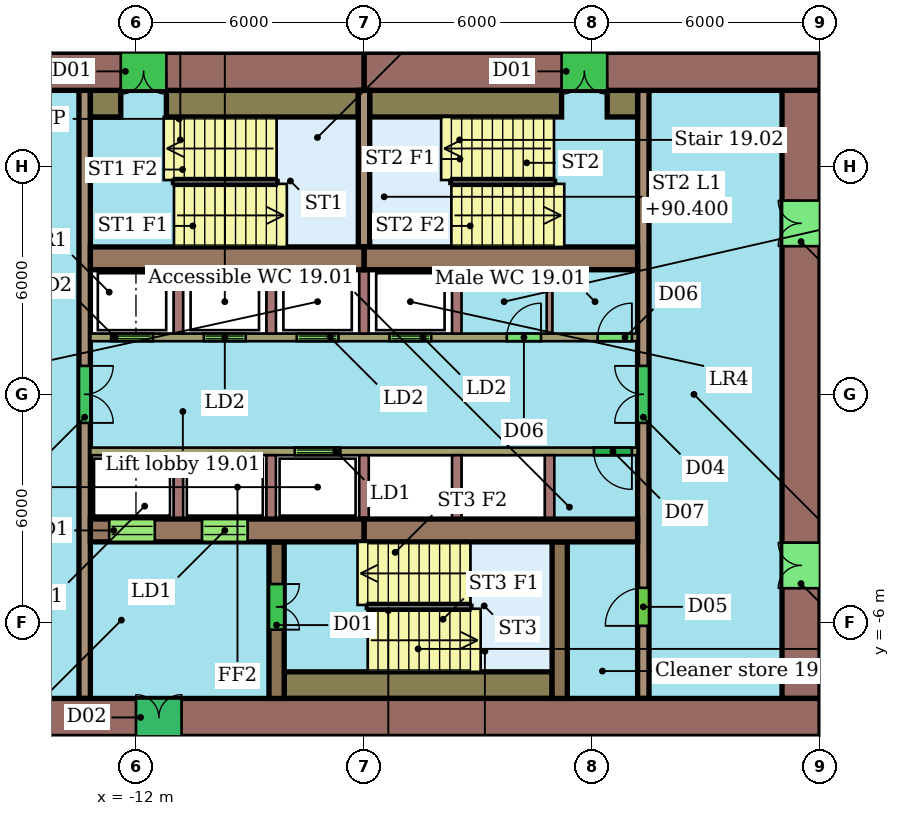
"""IFC4 building model, lengths in metres.
Left out: names, types, materials, properties, quantities, classifications, styles, units other than length and angle.
Written with IfcOpenShell. Run it as: python <this file> out.ifc"""

import sys

from ifc_helpers import new_model, si_unit, direction, frame, frame_2d, origin, place, context, subcontext, project, spatial, rectangle, extrude, element, fill, save


model = new_model("IFC4")
c1 = context("Model", 3, precision=1e-05, world=origin(), true_north=direction((0.0, 1.0)))
c2 = subcontext(c1, "Body", "Model", "MODEL_VIEW")
j1 = project(units=[si_unit("LENGTHUNIT", "METRE"), si_unit("PLANEANGLEUNIT", "RADIAN")], contexts=[c1])
p1 = place(None, origin())
s1 = spatial("IfcSite", under=j1, at=p1, CompositionType="ELEMENT")
p2 = place(p1, origin())
s2 = spatial("IfcBuilding", under=s1, at=p2, CompositionType="ELEMENT")
p3 = place(p2, frame((0.0, 0.0, 88.6)))
s3 = spatial("IfcBuildingStorey", under=s2, at=p3, CompositionType="ELEMENT", Elevation=88.6)
p4 = place(p3, frame((6.0, 8.5, 0.0), z_axis=(0.0, 0.0, 1.0), x_axis=(-1.0, 0.0, 0.0)))
e1 = element("IfcWall", 1, at=p4, inside=s3, PredefinedType="SHEAR", context=c2, shape_type="SweptSolid", body=[
    extrude(rectangle(XDim=12.0, YDim=1.0, at=frame_2d((6.0, 0.0))), origin(), (0.0, 0.0, 1.0), 3.3),
])
p5 = place(p4, frame((5.6, 0.0, 0.0)))
e2 = element("IfcOpeningElement", 2, at=p5, cuts=e1, PredefinedType="OPENING", context=c2, shape_type="SweptSolid", body=[
    extrude(rectangle(XDim=1.2, YDim=2.1, at=frame_2d((0.6, 1.05))), frame((0.0, 0.51, 0.0), z_axis=(0.0, -1.0, 0.0), x_axis=(1.0, 0.0, 0.0)), (0.0, 0.0, 1.0), 1.02),
])
p6 = place(p3, frame((-6.0, 8.5, 0.0), z_axis=(0.0, 0.0, 1.0), x_axis=(-1.0, 0.0, 0.0)))
e3 = element("IfcWall", 3, at=p6, inside=s3, PredefinedType="SHEAR", context=c2, shape_type="SweptSolid", body=[
    extrude(rectangle(XDim=12.0, YDim=1.0, at=frame_2d((6.0, 0.0))), origin(), (0.0, 0.0, 1.0), 3.3),
])
p7 = place(p6, frame((5.2, 0.0, 0.0)))
e4 = element("IfcOpeningElement", 4, at=p7, cuts=e3, PredefinedType="OPENING", context=c2, shape_type="SweptSolid", body=[
    extrude(rectangle(XDim=1.2, YDim=2.1, at=frame_2d((0.6, 1.05))), frame((0.0, 0.51, 0.0), z_axis=(0.0, -1.0, 0.0), x_axis=(1.0, 0.0, 0.0)), (0.0, 0.0, 1.0), 1.02),
])
p8 = place(p3, frame((-18.0, -8.5, 0.0), z_axis=(0.0, 0.0, 1.0), x_axis=(1.0, 0.0, 0.0)))
e5 = element("IfcWall", 5, at=p8, inside=s3, PredefinedType="SHEAR", context=c2, shape_type="SweptSolid", body=[
    extrude(rectangle(XDim=24.0, YDim=1.0, at=frame_2d((12.0, 0.0))), origin(), (0.0, 0.0, 1.0), 3.3),
])
p9 = place(p8, frame((6.0, 0.0, 0.0)))
e6 = element("IfcOpeningElement", 6, at=p9, cuts=e5, PredefinedType="OPENING", context=c2, shape_type="SweptSolid", body=[
    extrude(rectangle(XDim=1.2, YDim=2.1, at=frame_2d((0.6, 1.05))), frame((0.0, 0.51, 0.0), z_axis=(0.0, -1.0, 0.0), x_axis=(1.0, 0.0, 0.0)), (0.0, 0.0, 1.0), 1.02),
])
p10 = place(p3, frame((5.5, -8.0, 0.0), z_axis=(0.0, 0.0, 1.0), x_axis=(0.0, 1.0, 0.0)))
e7 = element("IfcWall", 7, at=p10, inside=s3, PredefinedType="SHEAR", context=c2, shape_type="SweptSolid", body=[
    extrude(rectangle(XDim=16.0, YDim=1.0, at=frame_2d((8.0, 0.0))), origin(), (0.0, 0.0, 1.0), 3.3),
])
p11 = place(p10, frame((2.9, 0.0, 0.0)))
e8 = element("IfcOpeningElement", 8, at=p11, cuts=e7, PredefinedType="OPENING", context=c2, shape_type="SweptSolid", body=[
    extrude(rectangle(XDim=1.2, YDim=2.1, at=frame_2d((0.6, 1.05))), frame((0.0, 0.51, 0.0), z_axis=(0.0, -1.0, 0.0), x_axis=(1.0, 0.0, 0.0)), (0.0, 0.0, 1.0), 1.02),
])
p12 = place(p10, frame((11.9, 0.0, 0.0)))
e9 = element("IfcOpeningElement", 9, at=p12, cuts=e7, PredefinedType="OPENING", context=c2, shape_type="SweptSolid", body=[
    extrude(rectangle(XDim=1.2, YDim=2.1, at=frame_2d((0.6, 1.05))), frame((0.0, 0.51, 0.0), z_axis=(0.0, -1.0, 0.0), x_axis=(1.0, 0.0, 0.0)), (0.0, 0.0, 1.0), 1.02),
])
for number, where, z_axis, x_axis in (
    (10, (-13.2, 3.58, 0.0), (0.0, 0.0, 1.0), (1.0, 0.0, 0.0)),
    (11, (-6.0, 3.58, 0.0), (0.0, 0.0, 1.0), (1.0, 0.0, 0.0)),
):
    element("IfcWall", number, at=place(p3, frame(where, z_axis=z_axis, x_axis=x_axis)), inside=s3, PredefinedType="SHEAR", context=c2, shape_type="SweptSolid", body=[
        extrude(rectangle(XDim=7.2, YDim=0.6, at=frame_2d((3.6, 0.0))), origin(), (0.0, 0.0, 1.0), 3.3),
    ])
p13 = place(p3, frame((-13.2, -3.58, 0.0), z_axis=(0.0, 0.0, 1.0), x_axis=(1.0, 0.0, 0.0)))
e12 = element("IfcWall", 12, at=p13, inside=s3, PredefinedType="SHEAR", context=c2, shape_type="SweptSolid", body=[
    extrude(rectangle(XDim=7.2, YDim=0.6, at=frame_2d((3.6, 0.0))), origin(), (0.0, 0.0, 1.0), 3.3),
])
p14 = place(p13, frame((0.496, 0.0, 0.0)))
e13 = element("IfcOpeningElement", 13, at=p14, cuts=e12, PredefinedType="OPENING", context=c2, shape_type="SweptSolid", body=[
    extrude(rectangle(XDim=1.2, YDim=2.1, at=frame_2d((0.6, 1.05))), frame((0.0, 0.31, 0.0), z_axis=(0.0, -1.0, 0.0), x_axis=(1.0, 0.0, 0.0)), (0.0, 0.0, 1.0), 0.62),
])
p15 = place(p13, frame((2.938, 0.0, 0.0)))
e14 = element("IfcOpeningElement", 14, at=p15, cuts=e12, PredefinedType="OPENING", context=c2, shape_type="SweptSolid", body=[
    extrude(rectangle(XDim=1.2, YDim=2.1, at=frame_2d((0.6, 1.05))), frame((0.0, 0.31, 0.0), z_axis=(0.0, -1.0, 0.0), x_axis=(1.0, 0.0, 0.0)), (0.0, 0.0, 1.0), 0.62),
])
p16 = place(p3, frame((-6.0, -3.58, 0.0), z_axis=(0.0, 0.0, 1.0), x_axis=(1.0, 0.0, 0.0)))
e15 = element("IfcWall", 15, at=p16, inside=s3, PredefinedType="SHEAR", context=c2, shape_type="SweptSolid", body=[
    extrude(rectangle(XDim=7.2, YDim=0.6, at=frame_2d((3.6, 0.0))), origin(), (0.0, 0.0, 1.0), 3.3),
])
p17 = place(p3, frame((-13.35, 8.0, 0.0), z_axis=(0.0, 0.0, 1.0), x_axis=(0.0, -1.0, 0.0)))
e16 = element("IfcWall", 16, at=p17, inside=s3, PredefinedType="SHEAR", context=c2, shape_type="SweptSolid", body=[
    extrude(rectangle(XDim=16.0, YDim=0.3, at=frame_2d((8.0, 0.0))), origin(), (0.0, 0.0, 1.0), 3.3),
])
p18 = place(p17, frame((7.25, 0.0, 0.0)))
e17 = element("IfcOpeningElement", 17, at=p18, cuts=e16, PredefinedType="OPENING", context=c2, shape_type="SweptSolid", body=[
    extrude(rectangle(XDim=1.5, YDim=2.1, at=frame_2d((0.75, 1.05))), frame((0.0, 0.16, 0.0), z_axis=(0.0, -1.0, 0.0), x_axis=(1.0, 0.0, 0.0)), (0.0, 0.0, 1.0), 0.32),
])
p19 = place(p3, frame((1.35, -8.0, 0.0), z_axis=(0.0, 0.0, 1.0), x_axis=(0.0, 1.0, 0.0)))
e18 = element("IfcWall", 18, at=p19, inside=s3, PredefinedType="SHEAR", context=c2, shape_type="SweptSolid", body=[
    extrude(rectangle(XDim=16.0, YDim=0.3, at=frame_2d((8.0, 0.0))), origin(), (0.0, 0.0, 1.0), 3.3),
])
p20 = place(p19, frame((1.91, 0.0, 0.0)))
e19 = element("IfcOpeningElement", 19, at=p20, cuts=e18, PredefinedType="OPENING", context=c2, shape_type="SweptSolid", body=[
    extrude(rectangle(XDim=1.0, YDim=2.1, at=frame_2d((0.5, 1.05))), frame((0.0, 0.16, 0.0), z_axis=(0.0, -1.0, 0.0), x_axis=(1.0, 0.0, 0.0)), (0.0, 0.0, 1.0), 0.32),
])
p21 = place(p19, frame((7.25, 0.0, 0.0)))
e20 = element("IfcOpeningElement", 20, at=p21, cuts=e18, PredefinedType="OPENING", context=c2, shape_type="SweptSolid", body=[
    extrude(rectangle(XDim=1.5, YDim=2.1, at=frame_2d((0.75, 1.05))), frame((0.0, 0.16, 0.0), z_axis=(0.0, -1.0, 0.0), x_axis=(1.0, 0.0, 0.0)), (0.0, 0.0, 1.0), 0.32),
])
p22 = place(p3, frame((-13.2, 1.5, 0.0), z_axis=(0.0, 0.0, 1.0), x_axis=(1.0, 0.0, 0.0)))
e21 = element("IfcWall", 21, at=p22, inside=s3, PredefinedType="SHEAR", context=c2, shape_type="SweptSolid", body=[
    extrude(rectangle(XDim=14.4, YDim=0.2, at=frame_2d((7.2, 0.0))), origin(), (0.0, 0.0, 1.0), 3.3),
])
p23 = place(p22, frame((0.546, 0.0, 0.0)))
e22 = element("IfcOpeningElement", 22, at=p23, cuts=e21, PredefinedType="OPENING", context=c2, shape_type="SweptSolid", body=[
    extrude(rectangle(XDim=1.1, YDim=2.1, at=frame_2d((0.55, 1.05))), frame((0.0, 0.11, 0.0), z_axis=(0.0, -1.0, 0.0), x_axis=(1.0, 0.0, 0.0)), (0.0, 0.0, 1.0), 0.22),
])
p24 = place(p22, frame((2.988, 0.0, 0.0)))
e23 = element("IfcOpeningElement", 23, at=p24, cuts=e21, PredefinedType="OPENING", context=c2, shape_type="SweptSolid", body=[
    extrude(rectangle(XDim=1.1, YDim=2.1, at=frame_2d((0.55, 1.05))), frame((0.0, 0.11, 0.0), z_axis=(0.0, -1.0, 0.0), x_axis=(1.0, 0.0, 0.0)), (0.0, 0.0, 1.0), 0.22),
])
p25 = place(p22, frame((5.429, 0.0, 0.0)))
e24 = element("IfcOpeningElement", 24, at=p25, cuts=e21, PredefinedType="OPENING", context=c2, shape_type="SweptSolid", body=[
    extrude(rectangle(XDim=1.1, YDim=2.1, at=frame_2d((0.55, 1.05))), frame((0.0, 0.11, 0.0), z_axis=(0.0, -1.0, 0.0), x_axis=(1.0, 0.0, 0.0)), (0.0, 0.0, 1.0), 0.22),
])
p26 = place(p22, frame((7.871, 0.0, 0.0)))
e25 = element("IfcOpeningElement", 25, at=p26, cuts=e21, PredefinedType="OPENING", context=c2, shape_type="SweptSolid", body=[
    extrude(rectangle(XDim=1.1, YDim=2.1, at=frame_2d((0.55, 1.05))), frame((0.0, 0.11, 0.0), z_axis=(0.0, -1.0, 0.0), x_axis=(1.0, 0.0, 0.0)), (0.0, 0.0, 1.0), 0.22),
])
p27 = place(p22, frame((10.958, 0.0, 0.0)))
e26 = element("IfcOpeningElement", 26, at=p27, cuts=e21, PredefinedType="OPENING", context=c2, shape_type="SweptSolid", body=[
    extrude(rectangle(XDim=0.9, YDim=2.1, at=frame_2d((0.45, 1.05))), frame((0.0, 0.11, 0.0), z_axis=(0.0, -1.0, 0.0), x_axis=(1.0, 0.0, 0.0)), (0.0, 0.0, 1.0), 0.22),
])
p28 = place(p22, frame((13.35, 0.0, 0.0)))
e27 = element("IfcOpeningElement", 27, at=p28, cuts=e21, PredefinedType="OPENING", context=c2, shape_type="SweptSolid", body=[
    extrude(rectangle(XDim=0.9, YDim=2.1, at=frame_2d((0.45, 1.05))), frame((0.0, 0.11, 0.0), z_axis=(0.0, -1.0, 0.0), x_axis=(1.0, 0.0, 0.0)), (0.0, 0.0, 1.0), 0.22),
])
p29 = place(p3, frame((1.2, -1.5, 0.0), z_axis=(0.0, 0.0, 1.0), x_axis=(-1.0, 0.0, 0.0)))
e28 = element("IfcWall", 28, at=p29, inside=s3, PredefinedType="SHEAR", context=c2, shape_type="SweptSolid", body=[
    extrude(rectangle(XDim=14.4, YDim=0.2, at=frame_2d((7.2, 0.0))), origin(), (0.0, 0.0, 1.0), 3.3),
])
p30 = place(p29, frame((7.821, 0.0, 0.0)))
e29 = element("IfcOpeningElement", 29, at=p30, cuts=e28, PredefinedType="OPENING", context=c2, shape_type="SweptSolid", body=[
    extrude(rectangle(XDim=1.2, YDim=2.1, at=frame_2d((0.6, 1.05))), frame((0.0, 0.11, 0.0), z_axis=(0.0, -1.0, 0.0), x_axis=(1.0, 0.0, 0.0)), (0.0, 0.0, 1.0), 0.22),
])
p31 = place(p29, frame((0.15, 0.0, 0.0)))
e30 = element("IfcOpeningElement", 30, at=p31, cuts=e28, PredefinedType="OPENING", context=c2, shape_type="SweptSolid", body=[
    extrude(rectangle(XDim=1.0, YDim=2.1, at=frame_2d((0.5, 1.05))), frame((0.0, 0.11, 0.0), z_axis=(0.0, -1.0, 0.0), x_axis=(1.0, 0.0, 0.0)), (0.0, 0.0, 1.0), 0.22),
])
p32 = place(p3, frame((-8.3, -3.88, 0.0), z_axis=(0.0, 0.0, 1.0), x_axis=(0.0, -1.0, 0.0)))
e31 = element("IfcWall", 31, at=p32, inside=s3, PredefinedType="SHEAR", context=c2, shape_type="SweptSolid", body=[
    extrude(rectangle(XDim=4.12, YDim=0.4, at=frame_2d((2.06, 0.0))), origin(), (0.0, 0.0, 1.0), 3.3),
])
p33 = place(p32, frame((1.11, 0.0, 0.0)))
e32 = element("IfcOpeningElement", 32, at=p33, cuts=e31, PredefinedType="OPENING", context=c2, shape_type="SweptSolid", body=[
    extrude(rectangle(XDim=1.2, YDim=2.1, at=frame_2d((0.6, 1.05))), frame((0.0, 0.21, 0.0), z_axis=(0.0, -1.0, 0.0), x_axis=(1.0, 0.0, 0.0)), (0.0, 0.0, 1.0), 0.42),
])
p34 = place(p3, frame((-0.85, -3.88, 0.0), z_axis=(0.0, 0.0, 1.0), x_axis=(0.0, -1.0, 0.0)))
e33 = element("IfcWall", 33, at=p34, inside=s3, PredefinedType="SHEAR", context=c2, shape_type="SweptSolid", body=[
    extrude(rectangle(XDim=4.12, YDim=0.4, at=frame_2d((2.06, 0.0))), origin(), (0.0, 0.0, 1.0), 3.3),
])
p35 = place(p3, frame((-6.0, 3.88, 0.0), z_axis=(0.0, 0.0, 1.0), x_axis=(0.0, 1.0, 0.0)))
e34 = element("IfcWall", 34, at=p35, inside=s3, PredefinedType="SHEAR", context=c2, shape_type="SweptSolid", body=[
    extrude(rectangle(XDim=4.12, YDim=0.3, at=frame_2d((2.06, 0.0))), origin(), (0.0, 0.0, 1.0), 3.3),
])
p36 = place(p3, frame((-13.2, 7.65, 0.0), z_axis=(0.0, 0.0, 1.0), x_axis=(1.0, 0.0, 0.0)))
e35 = element("IfcWall", 35, at=p36, inside=s3, PredefinedType="SHEAR", context=c2, shape_type="SweptSolid", body=[
    extrude(rectangle(XDim=0.8, YDim=0.7, at=frame_2d((0.4, 0.0))), origin(), (0.0, 0.0, 1.0), 3.3),
])
for number, where, z_axis, x_axis in (
    (36, (-11.2, 7.65, 0.0), (0.0, 0.0, 1.0), (1.0, 0.0, 0.0)),
    (37, (-5.85, 7.65, 0.0), (0.0, 0.0, 1.0), (1.0, 0.0, 0.0)),
):
    element("IfcWall", number, at=place(p3, frame(where, z_axis=z_axis, x_axis=x_axis)), inside=s3, PredefinedType="SHEAR", context=c2, shape_type="SweptSolid", body=[
        extrude(rectangle(XDim=5.05, YDim=0.7, at=frame_2d((2.525, 0.0))), origin(), (0.0, 0.0, 1.0), 3.3),
    ])
p37 = place(p3, frame((0.4, 7.65, 0.0), z_axis=(0.0, 0.0, 1.0), x_axis=(1.0, 0.0, 0.0)))
e38 = element("IfcWall", 38, at=p37, inside=s3, PredefinedType="SHEAR", context=c2, shape_type="SweptSolid", body=[
    extrude(rectangle(XDim=0.8, YDim=0.7, at=frame_2d((0.4, 0.0))), origin(), (0.0, 0.0, 1.0), 3.3),
])
p38 = place(p3, frame((-8.1, -7.65, 0.0), z_axis=(0.0, 0.0, 1.0), x_axis=(1.0, 0.0, 0.0)))
e39 = element("IfcWall", 39, at=p38, inside=s3, PredefinedType="SHEAR", context=c2, shape_type="SweptSolid", body=[
    extrude(rectangle(XDim=7.05, YDim=0.7, at=frame_2d((3.525, 0.0))), origin(), (0.0, 0.0, 1.0), 3.3),
])
for number, where, z_axis, x_axis in (
    (40, (-10.883, 1.6, 0.0), (0.0, 0.0, 1.0), (0.0, 1.0, 0.0)),
    (41, (-8.442, 1.6, 0.0), (0.0, 0.0, 1.0), (0.0, 1.0, 0.0)),
    (42, (-6.0, 1.6, 0.0), (0.0, 0.0, 1.0), (0.0, 1.0, 0.0)),
    (43, (-3.558, 1.6, 0.0), (0.0, 0.0, 1.0), (0.0, 1.0, 0.0)),
):
    element("IfcWall", number, at=place(p3, frame(where, z_axis=z_axis, x_axis=x_axis)), inside=s3, PredefinedType="SHEAR", context=c2, shape_type="SweptSolid", body=[
        extrude(rectangle(XDim=1.68, YDim=0.25, at=frame_2d((0.84, 0.0))), origin(), (0.0, 0.0, 1.0), 3.3),
    ])
p39 = place(p3, frame((-1.117, 1.6, 0.0), z_axis=(0.0, 0.0, 1.0), x_axis=(0.0, 1.0, 0.0)))
e44 = element("IfcWall", 44, at=p39, inside=s3, PredefinedType="PARTITIONING", context=c2, shape_type="SweptSolid", body=[
    extrude(rectangle(XDim=1.68, YDim=0.15, at=frame_2d((0.84, 0.0))), origin(), (0.0, 0.0, 1.0), 3.3),
])
for number, where, z_axis, x_axis in (
    (45, (-10.883, -1.6, 0.0), (0.0, 0.0, 1.0), (0.0, -1.0, 0.0)),
    (46, (-8.442, -1.6, 0.0), (0.0, 0.0, 1.0), (0.0, -1.0, 0.0)),
    (47, (-6.0, -1.6, 0.0), (0.0, 0.0, 1.0), (0.0, -1.0, 0.0)),
    (48, (-3.558, -1.6, 0.0), (0.0, 0.0, 1.0), (0.0, -1.0, 0.0)),
    (49, (-1.117, -1.6, 0.0), (0.0, 0.0, 1.0), (0.0, -1.0, 0.0)),
):
    element("IfcWall", number, at=place(p3, frame(where, z_axis=z_axis, x_axis=x_axis)), inside=s3, PredefinedType="SHEAR", context=c2, shape_type="SweptSolid", body=[
        extrude(rectangle(XDim=1.68, YDim=0.25, at=frame_2d((0.84, 0.0))), origin(), (0.0, 0.0, 1.0), 3.3),
    ])
p40 = place(p5, origin())
e50 = element("IfcDoor", 50, at=p40, inside=s3, OperationType="DOUBLE_DOOR_SINGLE_SWING", PredefinedType="NOTDEFINED", context=c2, shape_type="SweptSolid", body=[
    extrude(rectangle(XDim=1.2, YDim=2.1, at=frame_2d((0.6, 1.05))), frame((0.0, 0.025, 0.0), z_axis=(0.0, -1.0, 0.0), x_axis=(1.0, 0.0, 0.0)), (0.0, 0.0, 1.0), 0.05),
])
fill(e2, e50)
p41 = place(p7, origin())
e51 = element("IfcDoor", 51, at=p41, inside=s3, OperationType="DOUBLE_DOOR_SINGLE_SWING", PredefinedType="NOTDEFINED", context=c2, shape_type="SweptSolid", body=[
    extrude(rectangle(XDim=1.2, YDim=2.1, at=frame_2d((0.6, 1.05))), frame((0.0, 0.025, 0.0), z_axis=(0.0, -1.0, 0.0), x_axis=(1.0, 0.0, 0.0)), (0.0, 0.0, 1.0), 0.05),
])
fill(e4, e51)
p42 = place(p9, origin())
e52 = element("IfcDoor", 52, at=p42, inside=s3, OperationType="DOUBLE_DOOR_SINGLE_SWING", PredefinedType="NOTDEFINED", context=c2, shape_type="SweptSolid", body=[
    extrude(rectangle(XDim=1.2, YDim=2.1, at=frame_2d((0.6, 1.05))), frame((0.0, 0.025, 0.0), z_axis=(0.0, -1.0, 0.0), x_axis=(1.0, 0.0, 0.0)), (0.0, 0.0, 1.0), 0.05),
])
fill(e6, e52)
p43 = place(p11, origin())
e53 = element("IfcDoor", 53, at=p43, inside=s3, OperationType="DOUBLE_DOOR_SINGLE_SWING", PredefinedType="NOTDEFINED", context=c2, shape_type="SweptSolid", body=[
    extrude(rectangle(XDim=1.2, YDim=2.1, at=frame_2d((0.6, 1.05))), frame((0.0, 0.025, 0.0), z_axis=(0.0, -1.0, 0.0), x_axis=(1.0, 0.0, 0.0)), (0.0, 0.0, 1.0), 0.05),
])
fill(e8, e53)
p44 = place(p12, origin())
e54 = element("IfcDoor", 54, at=p44, inside=s3, OperationType="DOUBLE_DOOR_SINGLE_SWING", PredefinedType="NOTDEFINED", context=c2, shape_type="SweptSolid", body=[
    extrude(rectangle(XDim=1.2, YDim=2.1, at=frame_2d((0.6, 1.05))), frame((0.0, 0.025, 0.0), z_axis=(0.0, -1.0, 0.0), x_axis=(1.0, 0.0, 0.0)), (0.0, 0.0, 1.0), 0.05),
])
fill(e9, e54)
p45 = place(p14, origin())
e55 = element("IfcDoor", 55, at=p45, inside=s3, OperationType="DOUBLE_DOOR_SLIDING", PredefinedType="NOTDEFINED", context=c2, shape_type="SweptSolid", body=[
    extrude(rectangle(XDim=1.2, YDim=2.1, at=frame_2d((0.6, 1.05))), frame((0.0, 0.025, 0.0), z_axis=(0.0, -1.0, 0.0), x_axis=(1.0, 0.0, 0.0)), (0.0, 0.0, 1.0), 0.05),
])
fill(e13, e55)
p46 = place(p15, origin())
e56 = element("IfcDoor", 56, at=p46, inside=s3, OperationType="DOUBLE_DOOR_SLIDING", PredefinedType="NOTDEFINED", context=c2, shape_type="SweptSolid", body=[
    extrude(rectangle(XDim=1.2, YDim=2.1, at=frame_2d((0.6, 1.05))), frame((0.0, 0.025, 0.0), z_axis=(0.0, -1.0, 0.0), x_axis=(1.0, 0.0, 0.0)), (0.0, 0.0, 1.0), 0.05),
])
fill(e14, e56)
p47 = place(p18, origin())
e57 = element("IfcDoor", 57, at=p47, inside=s3, OperationType="DOUBLE_DOOR_SINGLE_SWING", PredefinedType="NOTDEFINED", context=c2, shape_type="SweptSolid", body=[
    extrude(rectangle(XDim=1.5, YDim=2.1, at=frame_2d((0.75, 1.05))), frame((0.0, 0.025, 0.0), z_axis=(0.0, -1.0, 0.0), x_axis=(1.0, 0.0, 0.0)), (0.0, 0.0, 1.0), 0.05),
])
fill(e17, e57)
p48 = place(p20, origin())
e58 = element("IfcDoor", 58, at=p48, inside=s3, OperationType="SINGLE_SWING_LEFT", PredefinedType="NOTDEFINED", context=c2, shape_type="SweptSolid", body=[
    extrude(rectangle(XDim=1.0, YDim=2.1, at=frame_2d((0.5, 1.05))), frame((0.0, 0.025, 0.0), z_axis=(0.0, -1.0, 0.0), x_axis=(1.0, 0.0, 0.0)), (0.0, 0.0, 1.0), 0.05),
])
fill(e19, e58)
p49 = place(p21, origin())
e59 = element("IfcDoor", 59, at=p49, inside=s3, OperationType="DOUBLE_DOOR_SINGLE_SWING", PredefinedType="NOTDEFINED", context=c2, shape_type="SweptSolid", body=[
    extrude(rectangle(XDim=1.5, YDim=2.1, at=frame_2d((0.75, 1.05))), frame((0.0, 0.025, 0.0), z_axis=(0.0, -1.0, 0.0), x_axis=(1.0, 0.0, 0.0)), (0.0, 0.0, 1.0), 0.05),
])
fill(e20, e59)
p50 = place(p23, origin())
e60 = element("IfcDoor", 60, at=p50, inside=s3, OperationType="DOUBLE_DOOR_SLIDING", PredefinedType="NOTDEFINED", context=c2, shape_type="SweptSolid", body=[
    extrude(rectangle(XDim=1.1, YDim=2.1, at=frame_2d((0.55, 1.05))), frame((0.0, 0.025, 0.0), z_axis=(0.0, -1.0, 0.0), x_axis=(1.0, 0.0, 0.0)), (0.0, 0.0, 1.0), 0.05),
])
fill(e22, e60)
p51 = place(p24, origin())
e61 = element("IfcDoor", 61, at=p51, inside=s3, OperationType="DOUBLE_DOOR_SLIDING", PredefinedType="NOTDEFINED", context=c2, shape_type="SweptSolid", body=[
    extrude(rectangle(XDim=1.1, YDim=2.1, at=frame_2d((0.55, 1.05))), frame((0.0, 0.025, 0.0), z_axis=(0.0, -1.0, 0.0), x_axis=(1.0, 0.0, 0.0)), (0.0, 0.0, 1.0), 0.05),
])
fill(e23, e61)
p52 = place(p25, origin())
e62 = element("IfcDoor", 62, at=p52, inside=s3, OperationType="DOUBLE_DOOR_SLIDING", PredefinedType="NOTDEFINED", context=c2, shape_type="SweptSolid", body=[
    extrude(rectangle(XDim=1.1, YDim=2.1, at=frame_2d((0.55, 1.05))), frame((0.0, 0.025, 0.0), z_axis=(0.0, -1.0, 0.0), x_axis=(1.0, 0.0, 0.0)), (0.0, 0.0, 1.0), 0.05),
])
fill(e24, e62)
p53 = place(p26, origin())
e63 = element("IfcDoor", 63, at=p53, inside=s3, OperationType="DOUBLE_DOOR_SLIDING", PredefinedType="NOTDEFINED", context=c2, shape_type="SweptSolid", body=[
    extrude(rectangle(XDim=1.1, YDim=2.1, at=frame_2d((0.55, 1.05))), frame((0.0, 0.025, 0.0), z_axis=(0.0, -1.0, 0.0), x_axis=(1.0, 0.0, 0.0)), (0.0, 0.0, 1.0), 0.05),
])
fill(e25, e63)
p54 = place(p27, origin())
e64 = element("IfcDoor", 64, at=p54, inside=s3, OperationType="SINGLE_SWING_RIGHT", PredefinedType="NOTDEFINED", context=c2, shape_type="SweptSolid", body=[
    extrude(rectangle(XDim=0.9, YDim=2.1, at=frame_2d((0.45, 1.05))), frame((0.0, 0.025, 0.0), z_axis=(0.0, -1.0, 0.0), x_axis=(1.0, 0.0, 0.0)), (0.0, 0.0, 1.0), 0.05),
])
fill(e26, e64)
p55 = place(p28, origin())
e65 = element("IfcDoor", 65, at=p55, inside=s3, OperationType="SINGLE_SWING_RIGHT", PredefinedType="NOTDEFINED", context=c2, shape_type="SweptSolid", body=[
    extrude(rectangle(XDim=0.9, YDim=2.1, at=frame_2d((0.45, 1.05))), frame((0.0, 0.025, 0.0), z_axis=(0.0, -1.0, 0.0), x_axis=(1.0, 0.0, 0.0)), (0.0, 0.0, 1.0), 0.05),
])
fill(e27, e65)
p56 = place(p30, origin())
e66 = element("IfcDoor", 66, at=p56, inside=s3, OperationType="DOUBLE_DOOR_SLIDING", PredefinedType="NOTDEFINED", context=c2, shape_type="SweptSolid", body=[
    extrude(rectangle(XDim=1.2, YDim=2.1, at=frame_2d((0.6, 1.05))), frame((0.0, 0.025, 0.0), z_axis=(0.0, -1.0, 0.0), x_axis=(1.0, 0.0, 0.0)), (0.0, 0.0, 1.0), 0.05),
])
fill(e29, e66)
p57 = place(p31, origin())
e67 = element("IfcDoor", 67, at=p57, inside=s3, OperationType="SINGLE_SWING_LEFT", PredefinedType="NOTDEFINED", context=c2, shape_type="SweptSolid", body=[
    extrude(rectangle(XDim=1.0, YDim=2.1, at=frame_2d((0.5, 1.05))), frame((0.0, 0.025, 0.0), z_axis=(0.0, -1.0, 0.0), x_axis=(1.0, 0.0, 0.0)), (0.0, 0.0, 1.0), 0.05),
])
fill(e30, e67)
p58 = place(p33, origin())
e68 = element("IfcDoor", 68, at=p58, inside=s3, OperationType="DOUBLE_DOOR_SINGLE_SWING", PredefinedType="NOTDEFINED", context=c2, shape_type="SweptSolid", body=[
    extrude(rectangle(XDim=1.2, YDim=2.1, at=frame_2d((0.6, 1.05))), frame((0.0, 0.025, 0.0), z_axis=(0.0, -1.0, 0.0), x_axis=(1.0, 0.0, 0.0)), (0.0, 0.0, 1.0), 0.05),
])
fill(e32, e68)
save(model, sys.argv[1])
